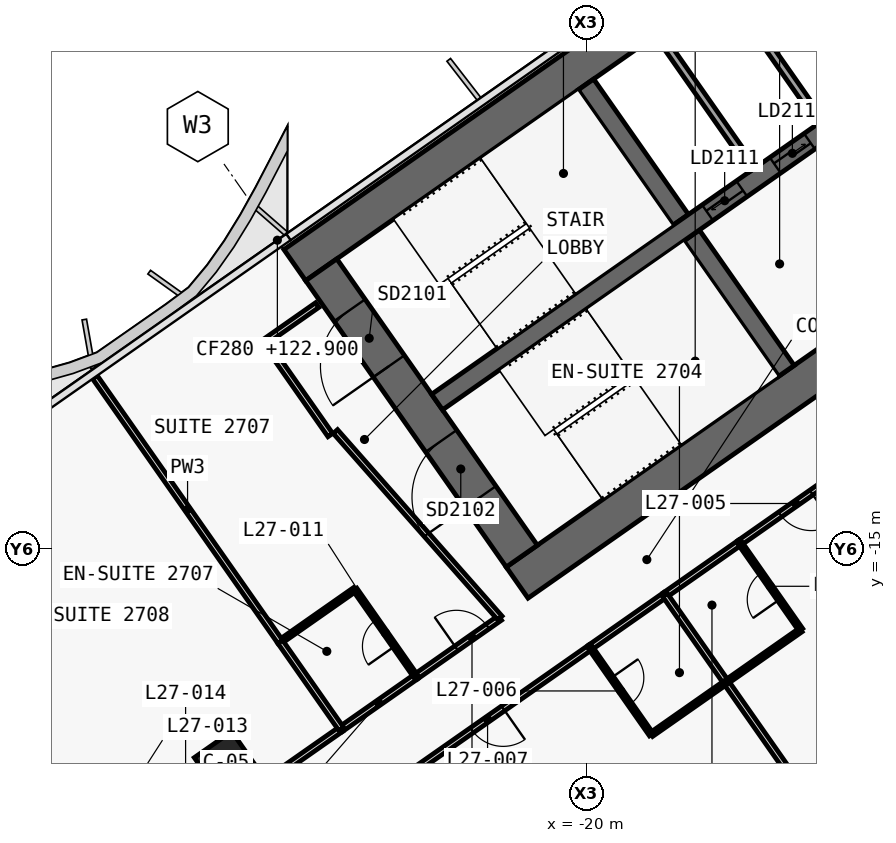
"""IFC4 building model, lengths in metres.
Left out: names, types, materials, properties, quantities, classifications, styles, units other than length and angle.
Written with IfcOpenShell. Run it as: python <this file> out.ifc"""

import sys

from ifc_helpers import new_model, si_unit, direction, frame, frame_2d, origin, origin_2d, place, context, subcontext, project, spatial, polyline, rectangle, outline, extrude, element, fill, save


model = new_model("IFC4")
c1 = context("Model", 3, precision=1e-05, world=origin(), true_north=direction((0.0, 1.0)))
c2 = subcontext(c1, "Body", "Model", "MODEL_VIEW")
j1 = project(units=[si_unit("LENGTHUNIT", "METRE"), si_unit("PLANEANGLEUNIT", "RADIAN")], contexts=[c1])
p1 = place(None, origin())
s1 = spatial("IfcSite", under=j1, at=p1, CompositionType="ELEMENT")
p2 = place(p1, origin())
s2 = spatial("IfcBuilding", under=s1, at=p2, CompositionType="ELEMENT")
p3 = place(p2, frame((0.0, 0.0, 122.9)))
s3 = spatial("IfcBuildingStorey", under=s2, at=p3, CompositionType="ELEMENT", Elevation=122.9)
p4 = place(p3, frame((0.037, 11.867, 0.0), z_axis=(0.0, 0.0, 1.0), x_axis=(-0.819155306259, -0.573571777746, 0.0)))
e1 = element("IfcWall", 1, at=p4, inside=s3, PredefinedType="SHEAR", context=c2, shape_type="SweptSolid", body=[
    extrude(outline(polyline([(33.837, 0.5), (0.7, 0.5), (0.0, -0.5), (33.837, -0.5), (33.837, 0.5)])), origin(), (0.0, 0.0, 1.0), 3.6),
])
p5 = place(p3, frame((0.037, -0.585, 0.0), z_axis=(0.0, 0.0, 1.0), x_axis=(-0.819157152511, -0.573569140985, 0.0)))
e2 = element("IfcWall", 2, at=p5, inside=s3, PredefinedType="SHEAR", context=c2, shape_type="SweptSolid", body=[
    extrude(outline(polyline([(26.695, 0.5), (0.7, 0.5), (0.0, -0.5), (26.695, -0.5), (26.695, 0.5)])), origin(), (0.0, 0.0, 1.0), 3.6),
])
p6 = place(p5, frame((2.995, 0.0, 0.0)))
e3 = element("IfcOpeningElement", 3, at=p6, cuts=e2, PredefinedType="OPENING", context=c2, shape_type="SweptSolid", body=[
    extrude(rectangle(XDim=2.4, YDim=2.1, at=frame_2d((1.2, 1.05))), frame((0.0, 0.51, 0.0), z_axis=(0.0, -1.0, 0.0), x_axis=(1.0, 0.0, 0.0)), (0.0, 0.0, 1.0), 1.02),
])
p7 = place(p5, frame((11.995, 0.0, 0.0)))
e4 = element("IfcOpeningElement", 4, at=p7, cuts=e2, PredefinedType="OPENING", context=c2, shape_type="SweptSolid", body=[
    extrude(rectangle(XDim=2.4, YDim=2.1, at=frame_2d((1.2, 1.05))), frame((0.0, 0.51, 0.0), z_axis=(0.0, -1.0, 0.0), x_axis=(1.0, 0.0, 0.0)), (0.0, 0.0, 1.0), 1.02),
])
p8 = place(p3, frame((-21.708, -15.2, 0.0), z_axis=(0.0, 0.0, 1.0), x_axis=(-0.573576324356, 0.819152122709, 0.0)))
e5 = element("IfcWall", 5, at=p8, inside=s3, PredefinedType="SHEAR", context=c2, shape_type="SweptSolid", body=[
    extrude(outline(polyline([(0.0, 0.5), (0.0, -0.5), (9.2, -0.5), (9.2, 0.5), (0.0, 0.5)])), origin(), (0.0, 0.0, 1.0), 3.6),
])
p9 = place(p8, frame((6.1, 0.0, 0.0)))
e6 = element("IfcOpeningElement", 6, at=p9, cuts=e5, PredefinedType="OPENING", context=c2, shape_type="SweptSolid", body=[
    extrude(rectangle(XDim=1.8, YDim=2.1, at=frame_2d((0.9, 1.05))), frame((0.0, 0.51, 0.0), z_axis=(0.0, -1.0, 0.0), x_axis=(1.0, 0.0, 0.0)), (0.0, 0.0, 1.0), 1.02),
])
p10 = place(p8, frame((1.9, 0.0, 0.0)))
e7 = element("IfcOpeningElement", 7, at=p10, cuts=e5, PredefinedType="OPENING", context=c2, shape_type="SweptSolid", body=[
    extrude(rectangle(XDim=1.8, YDim=2.1, at=frame_2d((0.9, 1.05))), frame((0.0, 0.51, 0.0), z_axis=(0.0, -1.0, 0.0), x_axis=(1.0, 0.0, 0.0)), (0.0, 0.0, 1.0), 1.02),
])
p11 = place(p3, frame((-14.745, -10.324, 0.0), z_axis=(0.0, 0.0, 1.0), x_axis=(-0.57356780395, 0.819158088694, 0.0)))
e8 = element("IfcWall", 8, at=p11, inside=s3, PredefinedType="SHEAR", context=c2, shape_type="SweptSolid", body=[
    extrude(outline(polyline([(4.35, 0.25), (0.0, 0.25), (0.0, -0.25), (4.35, -0.25), (4.35, 0.25)])), origin(), (0.0, 0.0, 1.0), 3.6),
])
p12 = place(p3, frame((-17.527, -6.352, 0.0), z_axis=(0.0, 0.0, 1.0), x_axis=(-0.573530143085, 0.819184457233, 0.0)))
e9 = element("IfcWall", 9, at=p12, inside=s3, PredefinedType="SHEAR", context=c2, shape_type="SweptSolid", body=[
    extrude(outline(polyline([(4.35, -0.25), (4.35, 0.25), (0.0, 0.25), (0.0, -0.25), (4.35, -0.25)])), origin(), (0.0, 0.0, 1.0), 3.6),
])
p13 = place(p3, frame((-2.638, 3.768, 0.0), z_axis=(0.0, 0.0, 1.0), x_axis=(-0.819148977158, -0.573580816643, 0.0)))
e10 = element("IfcWall", 10, at=p13, inside=s3, PredefinedType="SHEAR", context=c2, shape_type="SweptSolid", body=[
    extrude(outline(polyline([(26.0, 0.25), (0.0, 0.25), (0.0, -0.25), (26.0, -0.25), (26.0, 0.25)])), origin(), (0.0, 0.0, 1.0), 3.6),
])
p14 = place(p13, frame((1.169, 0.0, 0.0)))
e11 = element("IfcOpeningElement", 11, at=p14, cuts=e10, PredefinedType="OPENING", context=c2, shape_type="SweptSolid", body=[
    extrude(rectangle(XDim=1.1, YDim=2.1, at=frame_2d((0.55, 1.05))), frame((0.0, 0.26, 0.0), z_axis=(0.0, -1.0, 0.0), x_axis=(1.0, 0.0, 0.0)), (0.0, 0.0, 1.0), 0.52),
])
p15 = place(p13, frame((3.206, 0.0, 0.0)))
e12 = element("IfcOpeningElement", 12, at=p15, cuts=e10, PredefinedType="OPENING", context=c2, shape_type="SweptSolid", body=[
    extrude(rectangle(XDim=1.1, YDim=2.1, at=frame_2d((0.55, 1.05))), frame((0.0, 0.26, 0.0), z_axis=(0.0, -1.0, 0.0), x_axis=(1.0, 0.0, 0.0)), (0.0, 0.0, 1.0), 0.52),
])
p16 = place(p13, frame((5.244, 0.0, 0.0)))
e13 = element("IfcOpeningElement", 13, at=p16, cuts=e10, PredefinedType="OPENING", context=c2, shape_type="SweptSolid", body=[
    extrude(rectangle(XDim=1.1, YDim=2.1, at=frame_2d((0.55, 1.05))), frame((0.0, 0.26, 0.0), z_axis=(0.0, -1.0, 0.0), x_axis=(1.0, 0.0, 0.0)), (0.0, 0.0, 1.0), 0.52),
])
p17 = place(p13, frame((7.281, 0.0, 0.0)))
e14 = element("IfcOpeningElement", 14, at=p17, cuts=e10, PredefinedType="OPENING", context=c2, shape_type="SweptSolid", body=[
    extrude(rectangle(XDim=1.1, YDim=2.1, at=frame_2d((0.55, 1.05))), frame((0.0, 0.26, 0.0), z_axis=(0.0, -1.0, 0.0), x_axis=(1.0, 0.0, 0.0)), (0.0, 0.0, 1.0), 0.52),
])
p18 = place(p13, frame((9.688, 0.0, 0.0)))
e15 = element("IfcOpeningElement", 15, at=p18, cuts=e10, PredefinedType="OPENING", context=c2, shape_type="SweptSolid", body=[
    extrude(rectangle(XDim=1.1, YDim=2.1, at=frame_2d((0.55, 1.05))), frame((0.0, 0.26, 0.0), z_axis=(0.0, -1.0, 0.0), x_axis=(1.0, 0.0, 0.0)), (0.0, 0.0, 1.0), 0.52),
])
p19 = place(p13, frame((11.863, 0.0, 0.0)))
e16 = element("IfcOpeningElement", 16, at=p19, cuts=e10, PredefinedType="OPENING", context=c2, shape_type="SweptSolid", body=[
    extrude(rectangle(XDim=1.1, YDim=2.1, at=frame_2d((0.55, 1.05))), frame((0.0, 0.26, 0.0), z_axis=(0.0, -1.0, 0.0), x_axis=(1.0, 0.0, 0.0)), (0.0, 0.0, 1.0), 0.52),
])
p20 = place(p13, frame((14.038, 0.0, 0.0)))
e17 = element("IfcOpeningElement", 17, at=p20, cuts=e10, PredefinedType="OPENING", context=c2, shape_type="SweptSolid", body=[
    extrude(rectangle(XDim=1.1, YDim=2.1, at=frame_2d((0.55, 1.05))), frame((0.0, 0.26, 0.0), z_axis=(0.0, -1.0, 0.0), x_axis=(1.0, 0.0, 0.0)), (0.0, 0.0, 1.0), 0.52),
])
p21 = place(p13, frame((16.212, 0.0, 0.0)))
e18 = element("IfcOpeningElement", 18, at=p21, cuts=e10, PredefinedType="OPENING", context=c2, shape_type="SweptSolid", body=[
    extrude(rectangle(XDim=1.1, YDim=2.1, at=frame_2d((0.55, 1.05))), frame((0.0, 0.26, 0.0), z_axis=(0.0, -1.0, 0.0), x_axis=(1.0, 0.0, 0.0)), (0.0, 0.0, 1.0), 0.52),
])
p22 = place(p3, frame((-29.49, -20.649, 0.0), z_axis=(0.0, 0.0, 1.0), x_axis=(-0.819152044289, -0.573576436351, 0.0)))
e19 = element("IfcColumn", 19, at=p22, inside=s3, PredefinedType="COLUMN", context=c2, shape_type="SweptSolid", body=[
    extrude(rectangle(XDim=1.2, YDim=1.2, at=origin_2d()), origin(), (0.0, 0.0, 1.0), 3.6),
])
p23 = place(p3, frame((-12.059, -2.523, 0.0), z_axis=(0.0, 0.0, 1.0), x_axis=(-0.573594173421, 0.819139624372, 0.0)))
e20 = element("IfcWall", 20, at=p23, inside=s3, PredefinedType="SOLIDWALL", context=c2, shape_type="SweptSolid", body=[
    extrude(rectangle(XDim=4.35, YDim=0.2, at=frame_2d((2.175, 0.0))), origin(), (0.0, 0.0, 1.0), 3.6),
])
p24 = place(p3, frame((-13.84, -3.771, 0.0), z_axis=(0.0, 0.0, 1.0), x_axis=(-0.57356780395, 0.819158088694, 0.0)))
e21 = element("IfcWall", 21, at=p24, inside=s3, PredefinedType="SOLIDWALL", context=c2, shape_type="SweptSolid", body=[
    extrude(rectangle(XDim=4.35, YDim=0.2, at=frame_2d((2.175, 0.0))), origin(), (0.0, 0.0, 1.0), 3.6),
])
p25 = place(p3, frame((-15.622, -5.018, 0.0), z_axis=(0.0, 0.0, 1.0), x_axis=(-0.573594173421, 0.819139624372, 0.0)))
e22 = element("IfcWall", 22, at=p25, inside=s3, PredefinedType="SOLIDWALL", context=c2, shape_type="SweptSolid", body=[
    extrude(rectangle(XDim=4.35, YDim=0.2, at=frame_2d((2.175, 0.0))), origin(), (0.0, 0.0, 1.0), 3.6),
])
p26 = place(p3, frame((-24.493, -18.371, 0.0), z_axis=(0.0, 0.0, 1.0), x_axis=(0.819176640776, 0.573541307325, 0.0)))
e23 = element("IfcWall", 23, at=p26, inside=s3, PredefinedType="PARTITIONING", context=c2, shape_type="SweptSolid", body=[
    extrude(rectangle(XDim=2.698, YDim=0.15, at=frame_2d((1.349, 0.0))), origin(), (0.0, 0.0, 1.0), 3.32),
])
p27 = place(p26, frame((1.301, 0.0, 0.0)))
e24 = element("IfcOpeningElement", 24, at=p27, cuts=e23, PredefinedType="OPENING", context=c2, shape_type="SweptSolid", body=[
    extrude(rectangle(XDim=1.0, YDim=2.1, at=frame_2d((0.5, 1.05))), frame((0.0, 0.085, 0.0), z_axis=(0.0, -1.0, 0.0), x_axis=(1.0, 0.0, 0.0)), (0.0, 0.0, 1.0), 0.17),
])
p28 = place(p3, frame((-26.46, -19.748, 0.0), z_axis=(0.0, 0.0, 1.0), x_axis=(0.819179439794, 0.573537309527, 0.0)))
e25 = element("IfcWall", 25, at=p28, inside=s3, PredefinedType="PARTITIONING", context=c2, shape_type="SweptSolid", body=[
    extrude(rectangle(XDim=2.404, YDim=0.15, at=frame_2d((1.202, 0.0))), origin(), (0.0, 0.0, 1.0), 3.32),
])
p29 = place(p3, frame((-31.866, -23.533, 0.0), z_axis=(0.0, 0.0, 1.0), x_axis=(0.819153746897, 0.573574004767, 0.0)))
e26 = element("IfcWall", 26, at=p29, inside=s3, PredefinedType="PARTITIONING", context=c2, shape_type="SweptSolid", body=[
    extrude(rectangle(XDim=6.603, YDim=0.15, at=frame_2d((3.302, 0.0))), origin(), (0.0, 0.0, 1.0), 2.6),
])
p30 = place(p29, frame((1.101, 0.0, 0.0)))
e27 = element("IfcOpeningElement", 27, at=p30, cuts=e26, PredefinedType="OPENING", context=c2, shape_type="SweptSolid", body=[
    extrude(rectangle(XDim=1.0, YDim=2.1, at=frame_2d((0.5, 1.05))), frame((0.0, 0.085, 0.0), z_axis=(0.0, -1.0, 0.0), x_axis=(1.0, 0.0, 0.0)), (0.0, 0.0, 1.0), 0.17),
])
p31 = place(p3, frame((-13.022, -12.781, 0.0), z_axis=(0.0, 0.0, 1.0), x_axis=(-0.819145961204, -0.573585123798, 0.0)))
e28 = element("IfcWall", 28, at=p31, inside=s3, PredefinedType="PARTITIONING", context=c2, shape_type="SweptSolid", body=[
    extrude(rectangle(XDim=3.603, YDim=0.15, at=frame_2d((1.802, 0.0))), origin(), (0.0, 0.0, 1.0), 2.6),
])
p32 = place(p31, frame((1.302, 0.0, 0.0)))
e29 = element("IfcOpeningElement", 29, at=p32, cuts=e28, PredefinedType="OPENING", context=c2, shape_type="SweptSolid", body=[
    extrude(rectangle(XDim=1.0, YDim=2.1, at=frame_2d((0.5, 1.05))), frame((0.0, 0.085, 0.0), z_axis=(0.0, -1.0, 0.0), x_axis=(1.0, 0.0, 0.0)), (0.0, 0.0, 1.0), 0.17),
])
p33 = place(p3, frame((-15.971, -14.846, 0.0), z_axis=(0.0, 0.0, 1.0), x_axis=(-0.81922714955, -0.573469159974, 0.0)))
e30 = element("IfcWall", 30, at=p33, inside=s3, PredefinedType="PARTITIONING", context=c2, shape_type="SweptSolid", body=[
    extrude(rectangle(XDim=2.404, YDim=0.15, at=frame_2d((1.202, 0.0))), origin(), (0.0, 0.0, 1.0), 3.32),
])
p34 = place(p3, frame((-19.904, -17.599, 0.0), z_axis=(0.0, 0.0, 1.0), x_axis=(-0.819153746897, -0.573574004767, 0.0)))
e31 = element("IfcWall", 31, at=p34, inside=s3, PredefinedType="PARTITIONING", context=c2, shape_type="SweptSolid", body=[
    extrude(rectangle(XDim=6.603, YDim=0.15, at=frame_2d((3.302, 0.0))), origin(), (0.0, 0.0, 1.0), 2.6),
])
p35 = place(p34, frame((2.801, 0.0, 0.0)))
e32 = element("IfcOpeningElement", 32, at=p35, cuts=e31, PredefinedType="OPENING", context=c2, shape_type="SweptSolid", body=[
    extrude(rectangle(XDim=1.0, YDim=2.1, at=frame_2d((0.5, 1.05))), frame((0.0, 0.085, 0.0), z_axis=(0.0, -1.0, 0.0), x_axis=(1.0, 0.0, 0.0)), (0.0, 0.0, 1.0), 0.17),
])
p36 = place(p3, frame((-17.937, -16.222, 0.0), z_axis=(0.0, 0.0, 1.0), x_axis=(-0.819146032251, -0.573585022335, 0.0)))
e33 = element("IfcWall", 33, at=p36, inside=s3, PredefinedType="PARTITIONING", context=c2, shape_type="SweptSolid", body=[
    extrude(rectangle(XDim=2.404, YDim=0.15, at=frame_2d((1.202, 0.0))), origin(), (0.0, 0.0, 1.0), 3.32),
])
p37 = place(p3, frame((-26.746, -12.014, 0.0), z_axis=(0.0, 0.0, 1.0), x_axis=(-0.573560650686, 0.819163097304, 0.0)))
e34 = element("IfcWall", 34, at=p37, inside=s3, PredefinedType="PARTITIONING", context=c2, shape_type="SweptSolid", body=[
    extrude(rectangle(XDim=3.0, YDim=0.15, at=frame_2d((1.5, 0.0))), origin(), (0.0, 0.0, 1.0), 3.32),
])
p38 = place(p3, frame((-28.467, -9.556, 0.0), z_axis=(0.0, 0.0, 1.0), x_axis=(0.819109000826, 0.573637903879, 0.0)))
e35 = element("IfcWall", 35, at=p38, inside=s3, PredefinedType="PARTITIONING", context=c2, shape_type="SweptSolid", body=[
    extrude(rectangle(XDim=1.68, YDim=0.15, at=frame_2d((0.84, 0.0))), origin(), (0.0, 0.0, 1.0), 3.32),
])
p39 = place(p3, frame((-22.284, -16.827, 0.0), z_axis=(0.0, 0.0, 1.0), x_axis=(-0.661545117561, 0.749905365651, 0.0)))
e36 = element("IfcWall", 36, at=p39, inside=s3, PredefinedType="PARTITIONING", context=c2, shape_type="SweptSolid", body=[
    extrude(rectangle(XDim=6.543, YDim=0.15, at=frame_2d((3.271, 0.0))), origin(), (0.0, 0.0, 1.0), 2.6),
])
p40 = place(p3, frame((-26.099, -16.076, 0.0), z_axis=(0.0, 0.0, 1.0), x_axis=(-0.819155442668, -0.573571582932, 0.0)))
e37 = element("IfcWall", 37, at=p40, inside=s3, PredefinedType="PARTITIONING", context=c2, shape_type="SweptSolid", body=[
    extrude(rectangle(XDim=2.4, YDim=0.12, at=frame_2d((1.2, 0.0))), origin(), (0.0, 0.0, 1.0), 3.32),
])
p41 = place(p3, frame((-24.492, -18.37, 0.0), z_axis=(0.0, 0.0, 1.0), x_axis=(-0.573550118428, 0.819170471667, 0.0)))
e38 = element("IfcWall", 38, at=p41, inside=s3, PredefinedType="PARTITIONING", context=c2, shape_type="SweptSolid", body=[
    extrude(rectangle(XDim=2.8, YDim=0.12, at=frame_2d((1.4, 0.0))), origin(), (0.0, 0.0, 1.0), 2.6),
])
p42 = place(p41, frame((0.975, 0.0, 0.0)))
e39 = element("IfcOpeningElement", 39, at=p42, cuts=e38, PredefinedType="OPENING", context=c2, shape_type="SweptSolid", body=[
    extrude(rectangle(XDim=0.85, YDim=2.05, at=frame_2d((0.425, 1.025))), frame((0.0, 0.07, 0.0), z_axis=(0.0, -1.0, 0.0), x_axis=(1.0, 0.0, 0.0)), (0.0, 0.0, 1.0), 0.14),
])
p43 = place(p3, frame((-28.065, -17.453, 0.0), z_axis=(0.0, 0.0, 1.0), x_axis=(-0.573593433868, 0.819140142237, 0.0)))
e40 = element("IfcWall", 40, at=p43, inside=s3, PredefinedType="PARTITIONING", context=c2, shape_type="SweptSolid", body=[
    extrude(rectangle(XDim=8.499, YDim=0.15, at=frame_2d((4.25, 0.0))), origin(), (0.0, 0.0, 1.0), 2.6),
])
p44 = place(p3, frame((-26.458, -19.747, 0.0), z_axis=(0.0, 0.0, 1.0), x_axis=(-0.573550118428, 0.819170471667, 0.0)))
e41 = element("IfcWall", 41, at=p44, inside=s3, PredefinedType="PARTITIONING", context=c2, shape_type="SweptSolid", body=[
    extrude(rectangle(XDim=2.8, YDim=0.15, at=frame_2d((1.4, 0.0))), origin(), (0.0, 0.0, 1.0), 2.6),
])
p45 = place(p3, frame((-16.332, -18.518, 0.0), z_axis=(0.0, 0.0, 1.0), x_axis=(0.819155442668, 0.573571582932, 0.0)))
e42 = element("IfcWall", 42, at=p45, inside=s3, PredefinedType="PARTITIONING", context=c2, shape_type="SweptSolid", body=[
    extrude(rectangle(XDim=2.4, YDim=0.12, at=frame_2d((1.2, 0.0))), origin(), (0.0, 0.0, 1.0), 3.32),
])
p46 = place(p3, frame((-14.366, -17.14, 0.0), z_axis=(0.0, 0.0, 1.0), x_axis=(-0.573550118428, 0.819170471667, 0.0)))
e43 = element("IfcWall", 43, at=p46, inside=s3, PredefinedType="PARTITIONING", context=c2, shape_type="SweptSolid", body=[
    extrude(rectangle(XDim=2.8, YDim=0.12, at=frame_2d((1.4, 0.0))), origin(), (0.0, 0.0, 1.0), 3.32),
])
p47 = place(p46, frame((0.975, 0.0, 0.0)))
e44 = element("IfcOpeningElement", 44, at=p47, cuts=e43, PredefinedType="OPENING", context=c2, shape_type="SweptSolid", body=[
    extrude(rectangle(XDim=0.85, YDim=2.05, at=frame_2d((0.425, 1.025))), frame((0.0, 0.07, 0.0), z_axis=(0.0, -1.0, 0.0), x_axis=(1.0, 0.0, 0.0)), (0.0, 0.0, 1.0), 0.14),
])
p48 = place(p3, frame((-13.752, -22.203, 0.0), z_axis=(0.0, 0.0, 1.0), x_axis=(-0.573564311442, 0.819160534108, 0.0)))
e45 = element("IfcWall", 45, at=p48, inside=s3, PredefinedType="PARTITIONING", context=c2, shape_type="SweptSolid", body=[
    extrude(rectangle(XDim=4.499, YDim=0.15, at=frame_2d((2.25, 0.0))), origin(), (0.0, 0.0, 1.0), 2.5),
])
p49 = place(p3, frame((-16.333, -18.517, 0.0), z_axis=(0.0, 0.0, 1.0), x_axis=(-0.573591086599, 0.819141785879, 0.0)))
e46 = element("IfcWall", 46, at=p49, inside=s3, PredefinedType="PARTITIONING", context=c2, shape_type="SweptSolid", body=[
    extrude(rectangle(XDim=2.8, YDim=0.15, at=frame_2d((1.4, 0.0))), origin(), (0.0, 0.0, 1.0), 3.32),
])
p50 = place(p3, frame((-19.906, -17.6, 0.0), z_axis=(0.0, 0.0, 1.0), x_axis=(0.573550118428, -0.819170471667, 0.0)))
e47 = element("IfcWall", 47, at=p50, inside=s3, PredefinedType="PARTITIONING", context=c2, shape_type="SweptSolid", body=[
    extrude(rectangle(XDim=2.8, YDim=0.12, at=frame_2d((1.4, 0.0))), origin(), (0.0, 0.0, 1.0), 3.32),
])
p51 = place(p50, frame((0.975, 0.0, 0.0)))
e48 = element("IfcOpeningElement", 48, at=p51, cuts=e47, PredefinedType="OPENING", context=c2, shape_type="SweptSolid", body=[
    extrude(rectangle(XDim=0.85, YDim=2.05, at=frame_2d((0.425, 1.025))), frame((0.0, 0.07, 0.0), z_axis=(0.0, -1.0, 0.0), x_axis=(1.0, 0.0, 0.0)), (0.0, 0.0, 1.0), 0.14),
])
p52 = place(p3, frame((-18.298, -19.894, 0.0), z_axis=(0.0, 0.0, 1.0), x_axis=(0.819141114317, 0.573592045652, 0.0)))
e49 = element("IfcWall", 49, at=p52, inside=s3, PredefinedType="PARTITIONING", context=c2, shape_type="SweptSolid", body=[
    extrude(rectangle(XDim=2.4, YDim=0.12, at=frame_2d((1.2, 0.0))), origin(), (0.0, 0.0, 1.0), 3.32),
])
p53 = place(p20, origin())
e50 = element("IfcDoor", 50, at=p53, inside=s3, OperationType="SLIDING_TO_LEFT", PredefinedType="DOOR", context=c2, shape_type="SweptSolid", body=[
    extrude(rectangle(XDim=1.1, YDim=2.1, at=frame_2d((0.55, 1.05))), frame((0.0, 0.025, 0.0), z_axis=(0.0, -1.0, 0.0), x_axis=(1.0, 0.0, 0.0)), (0.0, 0.0, 1.0), 0.05),
])
fill(e17, e50)
p54 = place(p21, origin())
e51 = element("IfcDoor", 51, at=p54, inside=s3, OperationType="SLIDING_TO_RIGHT", PredefinedType="DOOR", context=c2, shape_type="SweptSolid", body=[
    extrude(rectangle(XDim=1.1, YDim=2.1, at=frame_2d((0.55, 1.05))), frame((0.0, 0.025, 0.0), z_axis=(0.0, -1.0, 0.0), x_axis=(1.0, 0.0, 0.0)), (0.0, 0.0, 1.0), 0.05),
])
fill(e18, e51)
p55 = place(p9, origin())
e52 = element("IfcDoor", 52, at=p55, inside=s3, OperationType="DOUBLE_DOOR_SINGLE_SWING", PredefinedType="DOOR", context=c2, shape_type="SweptSolid", body=[
    extrude(rectangle(XDim=1.8, YDim=2.1, at=frame_2d((0.9, 1.05))), frame((0.0, 0.025, 0.0), z_axis=(0.0, -1.0, 0.0), x_axis=(1.0, 0.0, 0.0)), (0.0, 0.0, 1.0), 0.05),
])
fill(e6, e52)
p56 = place(p10, origin())
e53 = element("IfcDoor", 53, at=p56, inside=s3, OperationType="DOUBLE_DOOR_SINGLE_SWING", PredefinedType="DOOR", context=c2, shape_type="SweptSolid", body=[
    extrude(rectangle(XDim=1.8, YDim=2.1, at=frame_2d((0.9, 1.05))), frame((0.0, 0.025, 0.0), z_axis=(0.0, -1.0, 0.0), x_axis=(1.0, 0.0, 0.0)), (0.0, 0.0, 1.0), 0.05),
])
fill(e7, e53)
p57 = place(p47, origin())
e54 = element("IfcDoor", 54, at=p57, inside=s3, OperationType="SINGLE_SWING_RIGHT", PredefinedType="DOOR", context=c2, shape_type="SweptSolid", body=[
    extrude(rectangle(XDim=0.85, YDim=2.05, at=frame_2d((0.425, 1.025))), frame((0.0, 0.025, 0.0), z_axis=(0.0, -1.0, 0.0), x_axis=(1.0, 0.0, 0.0)), (0.0, 0.0, 1.0), 0.05),
])
fill(e44, e54)
p58 = place(p32, origin())
e55 = element("IfcDoor", 55, at=p58, inside=s3, OperationType="SINGLE_SWING_LEFT", PredefinedType="DOOR", context=c2, shape_type="SweptSolid", body=[
    extrude(rectangle(XDim=1.0, YDim=2.1, at=frame_2d((0.5, 1.05))), frame((0.0, 0.025, 0.0), z_axis=(0.0, -1.0, 0.0), x_axis=(1.0, 0.0, 0.0)), (0.0, 0.0, 1.0), 0.05),
])
fill(e29, e55)
p59 = place(p51, origin())
e56 = element("IfcDoor", 56, at=p59, inside=s3, OperationType="SINGLE_SWING_RIGHT", PredefinedType="DOOR", context=c2, shape_type="SweptSolid", body=[
    extrude(rectangle(XDim=0.85, YDim=2.05, at=frame_2d((0.425, 1.025))), frame((0.0, 0.025, 0.0), z_axis=(0.0, -1.0, 0.0), x_axis=(1.0, 0.0, 0.0)), (0.0, 0.0, 1.0), 0.05),
])
fill(e48, e56)
p60 = place(p35, origin())
e57 = element("IfcDoor", 57, at=p60, inside=s3, OperationType="SINGLE_SWING_RIGHT", PredefinedType="DOOR", context=c2, shape_type="SweptSolid", body=[
    extrude(rectangle(XDim=1.0, YDim=2.1, at=frame_2d((0.5, 1.05))), frame((0.0, 0.025, 0.0), z_axis=(0.0, -1.0, 0.0), x_axis=(1.0, 0.0, 0.0)), (0.0, 0.0, 1.0), 0.05),
])
fill(e32, e57)
p61 = place(p42, origin())
e58 = element("IfcDoor", 58, at=p61, inside=s3, OperationType="SINGLE_SWING_LEFT", PredefinedType="DOOR", context=c2, shape_type="SweptSolid", body=[
    extrude(rectangle(XDim=0.85, YDim=2.05, at=frame_2d((0.425, 1.025))), frame((0.0, 0.025, 0.0), z_axis=(0.0, -1.0, 0.0), x_axis=(1.0, 0.0, 0.0)), (0.0, 0.0, 1.0), 0.05),
])
fill(e39, e58)
p62 = place(p27, origin())
e59 = element("IfcDoor", 59, at=p62, inside=s3, OperationType="SINGLE_SWING_RIGHT", PredefinedType="DOOR", context=c2, shape_type="SweptSolid", body=[
    extrude(rectangle(XDim=1.0, YDim=2.1, at=frame_2d((0.5, 1.05))), frame((0.0, 0.025, 0.0), z_axis=(0.0, -1.0, 0.0), x_axis=(1.0, 0.0, 0.0)), (0.0, 0.0, 1.0), 0.05),
])
fill(e24, e59)
save(model, sys.argv[1])
